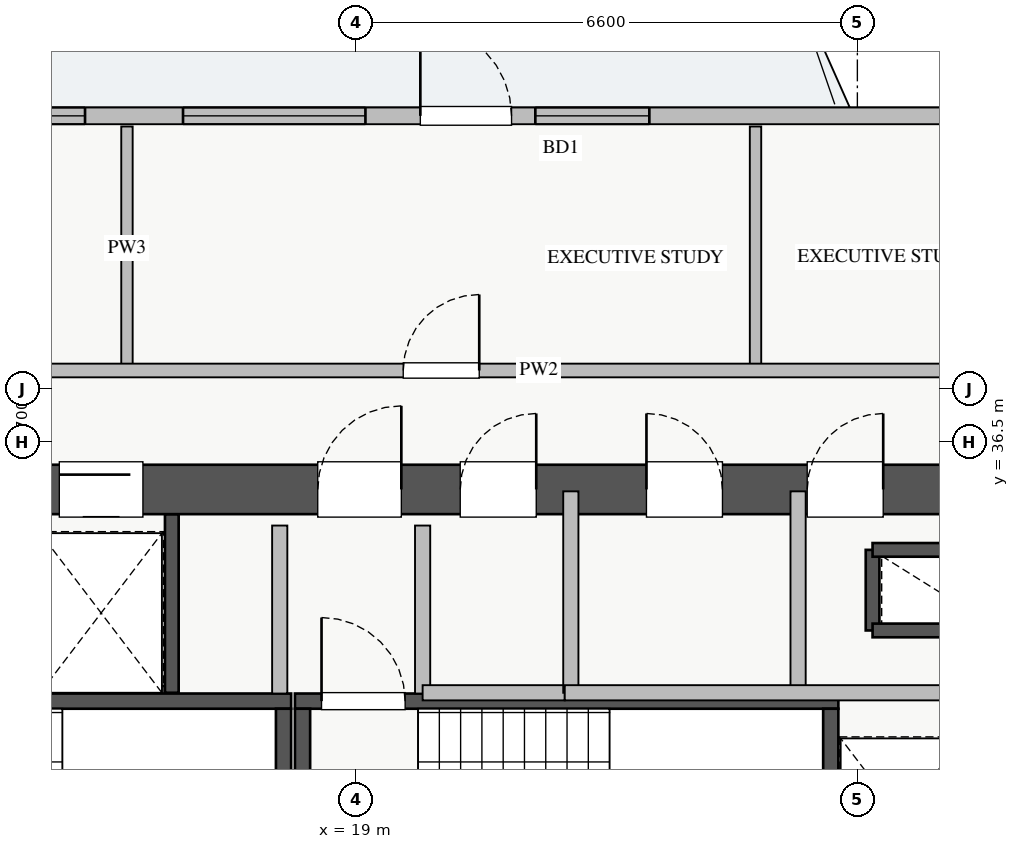
"""IFC4 building model, lengths in metres.
Left out: names, types, materials, properties, quantities, classifications, styles, units other than length and angle.
Written with IfcOpenShell. Run it as: python <this file> out.ifc"""

import sys

from ifc_helpers import new_model, si_unit, direction, frame, frame_2d, origin, place, context, subcontext, project, spatial, rectangle, extrude, source, transform, mapped, element, fill, save


model = new_model("IFC4")
c1 = context("Model", 3, precision=1e-05, world=origin(), true_north=direction((0.0, 1.0)))
c2 = subcontext(c1, "Body", "Model", "MODEL_VIEW")
j1 = project(units=[si_unit("LENGTHUNIT", "METRE"), si_unit("PLANEANGLEUNIT", "RADIAN")], contexts=[c1])
p1 = place(None, origin())
s1 = spatial("IfcSite", under=j1, at=p1, CompositionType="ELEMENT")
p2 = place(p1, origin())
s2 = spatial("IfcBuilding", under=s1, at=p2, CompositionType="ELEMENT")
p3 = place(p2, frame((0.0, 0.0, 136.0)))
s3 = spatial("IfcBuildingStorey", under=s2, at=p3, CompositionType="ELEMENT", Elevation=136.0)
p4 = place(p3, frame((25.8, 34.02, 0.0), z_axis=(0.0, 0.0, 1.0), x_axis=(0.0, 1.0, 0.0)))
e1 = element("IfcWall", 1, at=p4, inside=s3, PredefinedType="SHEAR", context=c2, shape_type="SweptSolid", body=[
    extrude(rectangle(XDim=1.06, YDim=0.18, at=frame_2d((0.53, 0.0))), origin(), (0.0, 0.0, 1.0), 3.03),
])
for number, where, z_axis, x_axis in (
    (2, (25.8, 35.08, 0.0), (0.0, 0.0, 1.0), (1.0, 0.0, 0.0)),
    (3, (25.8, 34.02, 0.0), (0.0, 0.0, 1.0), (1.0, 0.0, 0.0)),
):
    element("IfcWall", number, at=place(p3, frame(where, z_axis=z_axis, x_axis=x_axis)), inside=s3, PredefinedType="SHEAR", context=c2, shape_type="SweptSolid", body=[
        extrude(rectangle(XDim=1.35, YDim=0.18, at=frame_2d((0.675, 0.0))), origin(), (0.0, 0.0, 1.0), 3.03),
    ])
p5 = place(p3, frame((14.62, 33.2, 0.0), z_axis=(0.0, 0.0, 1.0), x_axis=(1.0, 0.0, 0.0)))
e4 = element("IfcWall", 4, at=p5, inside=s3, PredefinedType="SHEAR", context=c2, shape_type="SweptSolid", body=[
    extrude(rectangle(XDim=1.96, YDim=0.18, at=frame_2d((0.98, 0.0))), origin(), (0.0, 0.0, 1.0), 3.03),
])
p6 = place(p3, frame((16.58, 33.2, 0.0), z_axis=(0.0, 0.0, 1.0), x_axis=(0.0, 1.0, 0.0)))
e5 = element("IfcWall", 5, at=p6, inside=s3, PredefinedType="SHEAR", context=c2, shape_type="SweptSolid", body=[
    extrude(rectangle(XDim=2.35, YDim=0.18, at=frame_2d((1.175, 0.0))), origin(), (0.0, 0.0, 1.0), 3.03),
])
p7 = place(p3, frame((10.85, 33.09, 0.0), z_axis=(0.0, 0.0, 1.0), x_axis=(1.0, 0.0, 0.0)))
e6 = element("IfcWall", 6, at=p7, inside=s3, PredefinedType="SHEAR", context=c2, shape_type="SweptSolid", body=[
    extrude(rectangle(XDim=7.3, YDim=0.2, at=frame_2d((3.65, 0.0))), origin(), (0.0, 0.0, 1.0), 3.25),
])
p8 = place(p7, frame((0.35, 0.0, 0.0)))
e7 = element("IfcOpeningElement", 7, at=p8, cuts=e6, PredefinedType="OPENING", context=c2, shape_type="SweptSolid", body=[
    extrude(rectangle(XDim=1.1, YDim=2.05, at=frame_2d((0.55, 1.025))), frame((0.0, 0.11, 0.0), z_axis=(0.0, -1.0, 0.0), x_axis=(1.0, 0.0, 0.0)), (0.0, 0.0, 1.0), 0.22),
])
p9 = place(p3, frame((18.05, 30.05, 0.0), z_axis=(0.0, 0.0, 1.0), x_axis=(0.0, 1.0, 0.0)))
e8 = element("IfcWall", 8, at=p9, inside=s3, PredefinedType="SHEAR", context=c2, shape_type="SweptSolid", body=[
    extrude(rectangle(XDim=2.94, YDim=0.2, at=frame_2d((1.47, 0.0))), origin(), (0.0, 0.0, 1.0), 3.25),
])
p10 = place(p3, frame((18.2, 33.09, 0.0), z_axis=(0.0, 0.0, 1.0), x_axis=(1.0, 0.0, 0.0)))
e9 = element("IfcWall", 9, at=p10, inside=s3, PredefinedType="SHEAR", context=c2, shape_type="SweptSolid", body=[
    extrude(rectangle(XDim=7.15, YDim=0.2, at=frame_2d((3.575, 0.0))), origin(), (0.0, 0.0, 1.0), 3.25),
])
p11 = place(p10, frame((0.35, 0.0, 0.0)))
e10 = element("IfcOpeningElement", 10, at=p11, cuts=e9, PredefinedType="OPENING", context=c2, shape_type="SweptSolid", body=[
    extrude(rectangle(XDim=1.1, YDim=2.05, at=frame_2d((0.55, 1.025))), frame((0.0, 0.11, 0.0), z_axis=(0.0, -1.0, 0.0), x_axis=(1.0, 0.0, 0.0)), (0.0, 0.0, 1.0), 0.22),
])
for number, where, z_axis, x_axis in (
    (11, (18.3, 30.05, 0.0), (0.0, 0.0, 1.0), (0.0, 1.0, 0.0)),
    (12, (25.25, 30.05, 0.0), (0.0, 0.0, 1.0), (0.0, 1.0, 0.0)),
):
    element("IfcWall", number, at=place(p3, frame(where, z_axis=z_axis, x_axis=x_axis)), inside=s3, PredefinedType="SHEAR", context=c2, shape_type="SweptSolid", body=[
        extrude(rectangle(XDim=2.94, YDim=0.2, at=frame_2d((1.47, 0.0))), origin(), (0.0, 0.0, 1.0), 3.25),
    ])
p12 = place(p3, frame((10.2, 35.875, 0.0), z_axis=(0.0, 0.0, 1.0), x_axis=(1.0, 0.0, 0.0)))
e13 = element("IfcWall", 13, at=p12, inside=s3, PredefinedType="SHEAR", context=c2, shape_type="SweptSolid", body=[
    extrude(rectangle(XDim=17.6, YDim=0.65, at=frame_2d((8.8, 0.0))), origin(), (0.0, 0.0, 1.0), 3.25),
])
p13 = place(p12, frame((1.15, 0.0, 0.0)))
e14 = element("IfcOpeningElement", 14, at=p13, cuts=e13, PredefinedType="OPENING", context=c2, shape_type="SweptSolid", body=[
    extrude(rectangle(XDim=1.1, YDim=2.05, at=frame_2d((0.55, 1.025))), frame((0.0, 0.335, 0.0), z_axis=(0.0, -1.0, 0.0), x_axis=(1.0, 0.0, 0.0)), (0.0, 0.0, 1.0), 0.67),
])
p14 = place(p12, frame((8.3, 0.0, 0.0)))
e15 = element("IfcOpeningElement", 15, at=p14, cuts=e13, PredefinedType="OPENING", context=c2, shape_type="SweptSolid", body=[
    extrude(rectangle(XDim=1.1, YDim=2.05, at=frame_2d((0.55, 1.025))), frame((0.0, 0.335, 0.0), z_axis=(0.0, -1.0, 0.0), x_axis=(1.0, 0.0, 0.0)), (0.0, 0.0, 1.0), 0.67),
])
p15 = place(p12, frame((4.9, 0.0, 0.0)))
e16 = element("IfcOpeningElement", 16, at=p15, cuts=e13, PredefinedType="OPENING", context=c2, shape_type="SweptSolid", body=[
    extrude(rectangle(XDim=1.1, YDim=2.05, at=frame_2d((0.55, 1.025))), frame((0.0, 0.335, 0.0), z_axis=(0.0, -1.0, 0.0), x_axis=(1.0, 0.0, 0.0)), (0.0, 0.0, 1.0), 0.67),
])
p16 = place(p12, frame((14.74, 0.0, 0.0)))
e17 = element("IfcOpeningElement", 17, at=p16, cuts=e13, PredefinedType="OPENING", context=c2, shape_type="SweptSolid", body=[
    extrude(rectangle(XDim=1.0, YDim=2.05, at=frame_2d((0.5, 1.025))), frame((0.0, 0.335, 0.0), z_axis=(0.0, -1.0, 0.0), x_axis=(1.0, 0.0, 0.0)), (0.0, 0.0, 1.0), 0.67),
])
p17 = place(p12, frame((10.175, 0.0, 0.0)))
e18 = element("IfcOpeningElement", 18, at=p17, cuts=e13, PredefinedType="OPENING", context=c2, shape_type="SweptSolid", body=[
    extrude(rectangle(XDim=1.0, YDim=2.05, at=frame_2d((0.5, 1.025))), frame((0.0, 0.335, 0.0), z_axis=(0.0, -1.0, 0.0), x_axis=(1.0, 0.0, 0.0)), (0.0, 0.0, 1.0), 0.67),
])
p18 = place(p12, frame((12.625, 0.0, 0.0)))
e19 = element("IfcOpeningElement", 19, at=p18, cuts=e13, PredefinedType="OPENING", context=c2, shape_type="SweptSolid", body=[
    extrude(rectangle(XDim=1.0, YDim=2.05, at=frame_2d((0.5, 1.025))), frame((0.0, 0.335, 0.0), z_axis=(0.0, -1.0, 0.0), x_axis=(1.0, 0.0, 0.0)), (0.0, 0.0, 1.0), 0.67),
])
p19 = place(p3, frame((6.55, 40.79, 0.0), z_axis=(0.0, 0.0, 1.0), x_axis=(1.0, 0.0, 0.0)))
e20 = element("IfcWall", 20, at=p19, inside=s3, PredefinedType="STANDARD", context=c2, shape_type="SweptSolid", body=[
    extrude(rectangle(XDim=24.9, YDim=0.22, at=frame_2d((12.45, 0.0))), origin(), (0.0, 0.0, 1.0), 2.57),
])
p20 = place(p19, frame((13.3, 0.0, 0.0)))
e21 = element("IfcOpeningElement", 21, at=p20, cuts=e20, PredefinedType="OPENING", context=c2, shape_type="SweptSolid", body=[
    extrude(rectangle(XDim=1.2, YDim=2.1, at=frame_2d((0.6, 1.05))), frame((0.0, 0.12, 0.0), z_axis=(0.0, -1.0, 0.0), x_axis=(1.0, 0.0, 0.0)), (0.0, 0.0, 1.0), 0.24),
])
p21 = place(p19, frame((0.393, 0.0, 0.9)))
e22 = element("IfcOpeningElement", 22, at=p21, cuts=e20, PredefinedType="OPENING", context=c2, shape_type="SweptSolid", body=[
    extrude(rectangle(XDim=1.5, YDim=1.5, at=frame_2d((0.75, 0.75))), frame((0.0, 0.12, 0.0), z_axis=(0.0, -1.0, 0.0), x_axis=(1.0, 0.0, 0.0)), (0.0, 0.0, 1.0), 0.24),
])
p22 = place(p19, frame((7.088, 0.0, 0.9)))
e23 = element("IfcOpeningElement", 23, at=p22, cuts=e20, PredefinedType="OPENING", context=c2, shape_type="SweptSolid", body=[
    extrude(rectangle(XDim=1.8, YDim=1.5, at=frame_2d((0.9, 0.75))), frame((0.0, 0.12, 0.0), z_axis=(0.0, -1.0, 0.0), x_axis=(1.0, 0.0, 0.0)), (0.0, 0.0, 1.0), 0.24),
])
p23 = place(p19, frame((14.813, 0.0, 0.9)))
e24 = element("IfcOpeningElement", 24, at=p23, cuts=e20, PredefinedType="OPENING", context=c2, shape_type="SweptSolid", body=[
    extrude(rectangle(XDim=1.5, YDim=1.45, at=frame_2d((0.75, 0.725))), frame((0.0, 0.12, 0.0), z_axis=(0.0, -1.0, 0.0), x_axis=(1.0, 0.0, 0.0)), (0.0, 0.0, 1.0), 0.24),
])
p24 = place(p19, frame((20.738, 0.0, 0.9)))
e25 = element("IfcOpeningElement", 25, at=p24, cuts=e20, PredefinedType="OPENING", context=c2, shape_type="SweptSolid", body=[
    extrude(rectangle(XDim=2.1, YDim=1.48, at=frame_2d((1.05, 0.74))), frame((0.0, 0.12, 0.0), z_axis=(0.0, -1.0, 0.0), x_axis=(1.0, 0.0, 0.0)), (0.0, 0.0, 1.0), 0.24),
])
p25 = place(p19, frame((4.171, 0.0, 0.9)))
e26 = element("IfcOpeningElement", 26, at=p25, cuts=e20, PredefinedType="OPENING", context=c2, shape_type="SweptSolid", body=[
    extrude(rectangle(XDim=2.4, YDim=1.5, at=frame_2d((1.2, 0.75))), frame((0.0, 0.12, 0.0), z_axis=(0.0, -1.0, 0.0), x_axis=(1.0, 0.0, 0.0)), (0.0, 0.0, 1.0), 0.24),
])
p26 = place(p19, frame((10.177, 0.0, 0.9)))
e27 = element("IfcOpeningElement", 27, at=p26, cuts=e20, PredefinedType="OPENING", context=c2, shape_type="SweptSolid", body=[
    extrude(rectangle(XDim=2.4, YDim=1.5, at=frame_2d((1.2, 0.75))), frame((0.0, 0.12, 0.0), z_axis=(0.0, -1.0, 0.0), x_axis=(1.0, 0.0, 0.0)), (0.0, 0.0, 1.0), 0.24),
])
for number, where, z_axis, x_axis in (
    (28, (18.0, 33.19, 0.0), (0.0, 0.0, 1.0), (0.0, 1.0, 0.0)),
    (29, (19.88, 33.19, 0.0), (0.0, 0.0, 1.0), (0.0, 1.0, 0.0)),
):
    element("IfcWall", number, at=place(p3, frame(where, z_axis=z_axis, x_axis=x_axis)), inside=s3, PredefinedType="PARTITIONING", context=c2, shape_type="SweptSolid", body=[
        extrude(rectangle(XDim=2.21, YDim=0.2, at=frame_2d((1.105, 0.0))), origin(), (0.0, 0.0, 1.0), 3.03),
    ])
p27 = place(p3, frame((24.82, 33.2, 0.0), z_axis=(0.0, 0.0, 1.0), x_axis=(0.0, 1.0, 0.0)))
e30 = element("IfcWall", 30, at=p27, inside=s3, PredefinedType="PARTITIONING", context=c2, shape_type="SweptSolid", body=[
    extrude(rectangle(XDim=2.65, YDim=0.2, at=frame_2d((1.325, 0.0))), origin(), (0.0, 0.0, 1.0), 3.03),
])
p28 = place(p3, frame((19.88, 33.2, 0.0), z_axis=(0.0, 0.0, 1.0), x_axis=(1.0, 0.0, 0.0)))
e31 = element("IfcWall", 31, at=p28, inside=s3, PredefinedType="PARTITIONING", context=c2, shape_type="SweptSolid", body=[
    extrude(rectangle(XDim=1.87, YDim=0.2, at=frame_2d((0.935, 0.0))), origin(), (0.0, 0.0, 1.0), 3.03),
])
p29 = place(p3, frame((21.83, 33.2, 0.0), z_axis=(0.0, 0.0, 1.0), x_axis=(0.0, 1.0, 0.0)))
e32 = element("IfcWall", 32, at=p29, inside=s3, PredefinedType="PARTITIONING", context=c2, shape_type="SweptSolid", body=[
    extrude(rectangle(XDim=2.65, YDim=0.2, at=frame_2d((1.325, 0.0))), origin(), (0.0, 0.0, 1.0), 3.03),
])
p30 = place(p3, frame((21.75, 33.2, 0.0), z_axis=(0.0, 0.0, 1.0), x_axis=(1.0, 0.0, 0.0)))
e33 = element("IfcWall", 33, at=p30, inside=s3, PredefinedType="PARTITIONING", context=c2, shape_type="SweptSolid", body=[
    extrude(rectangle(XDim=5.17, YDim=0.2, at=frame_2d((2.585, 0.0))), origin(), (0.0, 0.0, 1.0), 3.03),
])
p31 = place(p3, frame((15.99, 37.44, 0.0), z_axis=(0.0, 0.0, 1.0), x_axis=(0.0, 1.0, 0.0)))
e34 = element("IfcWall", 34, at=p31, inside=s3, PredefinedType="PARTITIONING", context=c2, shape_type="SweptSolid", body=[
    extrude(rectangle(XDim=3.21, YDim=0.15, at=frame_2d((1.605, 0.0))), origin(), (0.0, 0.0, 1.0), 2.775),
])
p32 = place(p3, frame((24.26, 37.44, 0.0), z_axis=(0.0, 0.0, 1.0), x_axis=(0.0, 1.0, 0.0)))
e35 = element("IfcWall", 35, at=p32, inside=s3, PredefinedType="PARTITIONING", context=c2, shape_type="SweptSolid", body=[
    extrude(rectangle(XDim=3.21, YDim=0.15, at=frame_2d((1.605, 0.0))), origin(), (0.0, 0.0, 1.0), 3.03),
])
p33 = place(p3, frame((8.82, 37.44, 0.0), z_axis=(0.0, 0.0, 1.0), x_axis=(1.0, 0.0, 0.0)))
e36 = element("IfcWall", 36, at=p33, inside=s3, PredefinedType="PARTITIONING", context=c2, shape_type="SweptSolid", body=[
    extrude(rectangle(XDim=23.58, YDim=0.18, at=frame_2d((11.79, 0.0))), origin(), (0.0, 0.0, 1.0), 3.03),
])
p34 = place(p33, frame((3.085, 0.0, 0.0)))
e37 = element("IfcOpeningElement", 37, at=p34, cuts=e36, PredefinedType="OPENING", context=c2, shape_type="SweptSolid", body=[
    extrude(rectangle(XDim=1.0, YDim=2.05, at=frame_2d((0.5, 1.025))), frame((0.0, 0.1, 0.0), z_axis=(0.0, -1.0, 0.0), x_axis=(1.0, 0.0, 0.0)), (0.0, 0.0, 1.0), 0.2),
])
p35 = place(p33, frame((10.805, 0.0, 0.0)))
e38 = element("IfcOpeningElement", 38, at=p35, cuts=e36, PredefinedType="OPENING", context=c2, shape_type="SweptSolid", body=[
    extrude(rectangle(XDim=1.0, YDim=2.05, at=frame_2d((0.5, 1.025))), frame((0.0, 0.1, 0.0), z_axis=(0.0, -1.0, 0.0), x_axis=(1.0, 0.0, 0.0)), (0.0, 0.0, 1.0), 0.2),
])
p36 = place(p33, frame((18.8, 0.0, 0.0)))
e39 = element("IfcOpeningElement", 39, at=p36, cuts=e36, PredefinedType="OPENING", context=c2, shape_type="SweptSolid", body=[
    extrude(rectangle(XDim=1.0, YDim=2.05, at=frame_2d((0.5, 1.025))), frame((0.0, 0.1, 0.0), z_axis=(0.0, -1.0, 0.0), x_axis=(1.0, 0.0, 0.0)), (0.0, 0.0, 1.0), 0.2),
])
m1 = source(origin(), c2, "Body", "SweptSolid", [
    extrude(rectangle(XDim=1.2, YDim=2.1, at=frame_2d((0.6, 1.05))), frame((0.0, 0.025, 0.0), z_axis=(0.0, -1.0, 0.0), x_axis=(1.0, 0.0, 0.0)), (0.0, 0.0, 1.0), 0.05),
])
p37 = place(p20, origin())
e40 = element("IfcDoor", 40, at=p37, inside=s3, OperationType="SINGLE_SWING_LEFT", PredefinedType="DOOR", context=c2, shape_type="MappedRepresentation", body=[
    mapped(m1, transform((0.0, 0.0, 0.0), x_axis=(1.0, 0.0, 0.0), y_axis=(0.0, 1.0, 0.0), z_axis=(0.0, 0.0, 1.0), scale=1.0)),
])
fill(e21, e40)
m2 = source(origin(), c2, "Body", "SweptSolid", [
    extrude(rectangle(XDim=1.8, YDim=1.5, at=frame_2d((0.9, 0.75))), frame((0.0, 0.03, 0.0), z_axis=(0.0, -1.0, 0.0), x_axis=(1.0, 0.0, 0.0)), (0.0, 0.0, 1.0), 0.06),
])
p38 = place(p22, origin())
e41 = element("IfcWindow", 41, at=p38, inside=s3, PartitioningType="DOUBLE_PANEL_VERTICAL", PredefinedType="WINDOW", context=c2, shape_type="MappedRepresentation", body=[
    mapped(m2, transform((0.0, 0.0, 0.0), x_axis=(1.0, 0.0, 0.0), y_axis=(0.0, 1.0, 0.0), z_axis=(0.0, 0.0, 1.0), scale=1.0)),
])
fill(e23, e41)
m3 = source(origin(), c2, "Body", "SweptSolid", [
    extrude(rectangle(XDim=1.5, YDim=1.45, at=frame_2d((0.75, 0.725))), frame((0.0, 0.03, 0.0), z_axis=(0.0, -1.0, 0.0), x_axis=(1.0, 0.0, 0.0)), (0.0, 0.0, 1.0), 0.06),
])
p39 = place(p23, origin())
e42 = element("IfcWindow", 42, at=p39, inside=s3, PartitioningType="DOUBLE_PANEL_VERTICAL", PredefinedType="WINDOW", context=c2, shape_type="MappedRepresentation", body=[
    mapped(m3, transform((0.0, 0.0, 0.0), x_axis=(1.0, 0.0, 0.0), y_axis=(0.0, 1.0, 0.0), z_axis=(0.0, 0.0, 1.0), scale=1.0)),
])
fill(e24, e42)
m4 = source(origin(), c2, "Body", "SweptSolid", [
    extrude(rectangle(XDim=1.1, YDim=2.05, at=frame_2d((0.55, 1.025))), frame((0.0, 0.025, 0.0), z_axis=(0.0, -1.0, 0.0), x_axis=(1.0, 0.0, 0.0)), (0.0, 0.0, 1.0), 0.05),
])
p40 = place(p14, origin())
e43 = element("IfcDoor", 43, at=p40, inside=s3, OperationType="SINGLE_SWING_RIGHT", PredefinedType="DOOR", context=c2, shape_type="MappedRepresentation", body=[
    mapped(m4, transform((0.0, 0.0, 0.0), x_axis=(1.0, 0.0, 0.0), y_axis=(0.0, 1.0, 0.0), z_axis=(0.0, 0.0, 1.0), scale=1.0)),
])
fill(e15, e43)
p41 = place(p11, origin())
e44 = element("IfcDoor", 44, at=p41, inside=s3, OperationType="SINGLE_SWING_LEFT", PredefinedType="DOOR", context=c2, shape_type="MappedRepresentation", body=[
    mapped(m4, transform((0.0, 0.0, 0.0), x_axis=(1.0, 0.0, 0.0), y_axis=(0.0, 1.0, 0.0), z_axis=(0.0, 0.0, 1.0), scale=1.0)),
])
fill(e10, e44)
p42 = place(p15, origin())
e45 = element("IfcDoor", 45, at=p42, inside=s3, OperationType="SLIDING_TO_LEFT", PredefinedType="DOOR", context=c2, shape_type="MappedRepresentation", body=[
    mapped(m4, transform((0.0, 0.0, 0.0), x_axis=(1.0, 0.0, 0.0), y_axis=(0.0, 1.0, 0.0), z_axis=(0.0, 0.0, 1.0), scale=1.0)),
])
fill(e16, e45)
m5 = source(origin(), c2, "Body", "SweptSolid", [
    extrude(rectangle(XDim=1.0, YDim=2.05, at=frame_2d((0.5, 1.025))), frame((0.0, 0.025, 0.0), z_axis=(0.0, -1.0, 0.0), x_axis=(1.0, 0.0, 0.0)), (0.0, 0.0, 1.0), 0.05),
])
p43 = place(p16, origin())
e46 = element("IfcDoor", 46, at=p43, inside=s3, OperationType="SINGLE_SWING_RIGHT", PredefinedType="DOOR", context=c2, shape_type="MappedRepresentation", body=[
    mapped(m5, transform((0.0, 0.0, 0.0), x_axis=(1.0, 0.0, 0.0), y_axis=(0.0, 1.0, 0.0), z_axis=(0.0, 0.0, 1.0), scale=1.0)),
])
fill(e17, e46)
p44 = place(p17, origin())
e47 = element("IfcDoor", 47, at=p44, inside=s3, OperationType="SINGLE_SWING_RIGHT", PredefinedType="DOOR", context=c2, shape_type="MappedRepresentation", body=[
    mapped(m5, transform((0.0, 0.0, 0.0), x_axis=(1.0, 0.0, 0.0), y_axis=(0.0, 1.0, 0.0), z_axis=(0.0, 0.0, 1.0), scale=1.0)),
])
fill(e18, e47)
p45 = place(p18, origin())
e48 = element("IfcDoor", 48, at=p45, inside=s3, OperationType="SINGLE_SWING_LEFT", PredefinedType="DOOR", context=c2, shape_type="MappedRepresentation", body=[
    mapped(m5, transform((0.0, 0.0, 0.0), x_axis=(1.0, 0.0, 0.0), y_axis=(0.0, 1.0, 0.0), z_axis=(0.0, 0.0, 1.0), scale=1.0)),
])
fill(e19, e48)
p46 = place(p35, origin())
e49 = element("IfcDoor", 49, at=p46, inside=s3, OperationType="SINGLE_SWING_RIGHT", PredefinedType="DOOR", context=c2, shape_type="MappedRepresentation", body=[
    mapped(m5, transform((0.0, 0.0, 0.0), x_axis=(1.0, 0.0, 0.0), y_axis=(0.0, 1.0, 0.0), z_axis=(0.0, 0.0, 1.0), scale=1.0)),
])
fill(e38, e49)
m6 = source(origin(), c2, "Body", "SweptSolid", [
    extrude(rectangle(XDim=2.4, YDim=1.5, at=frame_2d((1.2, 0.75))), frame((0.0, 0.03, 0.0), z_axis=(0.0, -1.0, 0.0), x_axis=(1.0, 0.0, 0.0)), (0.0, 0.0, 1.0), 0.06),
])
p47 = place(p26, origin())
e50 = element("IfcWindow", 50, at=p47, inside=s3, PartitioningType="TRIPLE_PANEL_VERTICAL", PredefinedType="WINDOW", context=c2, shape_type="MappedRepresentation", body=[
    mapped(m6, transform((0.0, 0.0, 0.0), x_axis=(1.0, 0.0, 0.0), y_axis=(0.0, 1.0, 0.0), z_axis=(0.0, 0.0, 1.0), scale=1.0)),
])
fill(e27, e50)
save(model, sys.argv[1])
